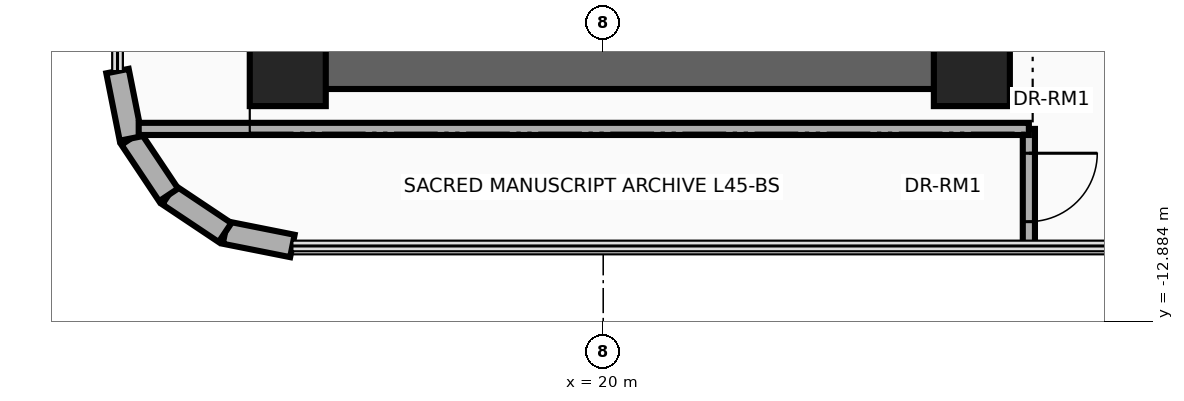
"""IFC4 building model, lengths in metres.
Left out: names, types, materials, properties, quantities, classifications, styles, units other than length and angle.
Written with IfcOpenShell. Run it as: python <this file> out.ifc"""

import sys

from ifc_helpers import new_model, si_unit, direction, frame, frame_2d, origin, origin_2d, place, context, subcontext, project, spatial, rectangle, extrude, source, transform, mapped, element, fill, save


model = new_model("IFC4")
c1 = context("Model", 3, precision=1e-05, world=origin(), true_north=direction((0.0, 1.0)))
c2 = subcontext(c1, "Body", "Model", "MODEL_VIEW")
j1 = project(units=[si_unit("LENGTHUNIT", "METRE"), si_unit("PLANEANGLEUNIT", "RADIAN")], contexts=[c1])
p1 = place(None, origin())
s1 = spatial("IfcSite", under=j1, at=p1, CompositionType="ELEMENT")
p2 = place(p1, origin())
s2 = spatial("IfcBuilding", under=s1, at=p2, CompositionType="ELEMENT")
p3 = place(p2, frame((0.0, 0.0, 176.55)))
s3 = spatial("IfcBuildingStorey", under=s2, at=p3, CompositionType="ELEMENT", Elevation=176.55)
p4 = place(p3, frame((24.85, -9.825, 0.0), z_axis=(0.0, 0.0, 1.0), x_axis=(0.0, 1.0, 0.0)))
e1 = element("IfcWall", 1, at=p4, inside=s3, PredefinedType="SHEAR", context=c2, shape_type="SweptSolid", body=[
    extrude(rectangle(XDim=8.875, YDim=0.55, at=frame_2d((4.438, 0.0))), origin(), (0.0, 0.0, 1.0), 3.63),
])
p5 = place(p3, frame((15.85, -9.55, 0.0), z_axis=(0.0, 0.0, 1.0), x_axis=(1.0, 0.0, 0.0)))
e2 = element("IfcWall", 2, at=p5, inside=s3, PredefinedType="SHEAR", context=c2, shape_type="SweptSolid", body=[
    extrude(rectangle(XDim=9.0, YDim=0.55, at=frame_2d((4.5, 0.0))), origin(), (0.0, 0.0, 1.0), 3.63),
])
m1 = source(origin(), c2, "Body", "SweptSolid", [
    extrude(rectangle(XDim=1.0, YDim=1.0, at=origin_2d()), origin(), (0.0, 0.0, 1.0), 3.95),
])
for number, where, z_axis, x_axis in (
    (3, (15.85, -9.55, 0.0), (0.0, 0.0, 1.0), (1.0, 0.0, 0.0)),
    (4, (24.85, -9.55, 0.0), (0.0, 0.0, 1.0), (1.0, 0.0, 0.0)),
):
    element("IfcColumn", number, at=place(p3, frame(where, z_axis=z_axis, x_axis=x_axis)), inside=s3, PredefinedType="COLUMN", context=c2, shape_type="MappedRepresentation", body=[
        mapped(m1, transform((0.0, 0.0, 0.0), x_axis=(1.0, 0.0, 0.0), y_axis=(0.0, 1.0, 0.0), z_axis=(0.0, 0.0, 1.0), scale=1.0)),
    ])
p6 = place(p3, frame((15.911, -11.89, 0.0), z_axis=(0.0, 0.0, 1.0), x_axis=(-0.980798241101, 0.195025152871, 0.0)))
e5 = element("IfcWall", 5, at=p6, inside=s3, PredefinedType="SOLIDWALL", context=c2, shape_type="SweptSolid", body=[
    extrude(rectangle(XDim=0.904, YDim=0.3, at=frame_2d((0.452, 0.0))), origin(), (0.0, 0.0, 1.0), 3.63),
])
for number, where, z_axis, x_axis in (
    (6, (15.024, -11.714, 0.0), (0.0, 0.0, 1.0), (-0.832, 0.556, 0.0)),
    (7, (14.282, -11.218, 0.0), (0.0, 0.0, 1.0), (-0.556, 0.832, 0.0)),
):
    element("IfcWall", number, at=place(p3, frame(where, z_axis=z_axis, x_axis=x_axis)), inside=s3, PredefinedType="SOLIDWALL", context=c2, shape_type="SweptSolid", body=[
        extrude(rectangle(XDim=0.893, YDim=0.3, at=frame_2d((0.446, 0.0))), origin(), (0.0, 0.0, 1.0), 3.63),
    ])
p7 = place(p3, frame((13.786, -10.476, 0.0), z_axis=(0.0, 0.0, 1.0), x_axis=(-0.195025152871, 0.980798241101, 0.0)))
e8 = element("IfcWall", 8, at=p7, inside=s3, PredefinedType="SOLIDWALL", context=c2, shape_type="SweptSolid", body=[
    extrude(rectangle(XDim=0.904, YDim=0.3, at=frame_2d((0.452, 0.0))), origin(), (0.0, 0.0, 1.0), 3.63),
])
p8 = place(p3, frame((25.6, -11.89, 0.0), z_axis=(0.0, 0.0, 1.0), x_axis=(0.0, 1.0, 0.0)))
e9 = element("IfcWall", 9, at=p8, inside=s3, PredefinedType="PARTITIONING", context=c2, shape_type="SweptSolid", body=[
    extrude(rectangle(XDim=1.54, YDim=0.16, at=frame_2d((0.77, 0.0))), origin(), (0.0, 0.0, 1.0), 3.63),
])
p9 = place(p8, frame((0.32, 0.0, 0.0)))
e10 = element("IfcOpeningElement", 10, at=p9, cuts=e9, PredefinedType="OPENING", context=c2, shape_type="SweptSolid", body=[
    extrude(rectangle(XDim=0.9, YDim=2.1, at=frame_2d((0.45, 1.05))), frame((0.0, 0.095, 0.0), z_axis=(0.0, -1.0, 0.0), x_axis=(1.0, 0.0, 0.0)), (0.0, 0.0, 1.0), 0.19),
])
p10 = place(p3, frame((13.889, -10.35, 0.0), z_axis=(0.0, 0.0, 1.0), x_axis=(1.0, 0.0, 0.0)))
e11 = element("IfcWall", 11, at=p10, inside=s3, PredefinedType="PARTITIONING", context=c2, shape_type="SweptSolid", body=[
    extrude(rectangle(XDim=11.711, YDim=0.16, at=frame_2d((5.855, 0.0))), origin(), (0.0, 0.0, 1.0), 3.63),
])
p11 = place(p9, frame((0.9, 0.0, 0.0), z_axis=(0.0, 0.0, 1.0), x_axis=(-1.0, 0.0, 0.0)))
e12 = element("IfcDoor", 12, at=p11, inside=s3, OperationType="SINGLE_SWING_LEFT", PredefinedType="DOOR", context=c2, shape_type="SweptSolid", body=[
    extrude(rectangle(XDim=0.9, YDim=2.1, at=frame_2d((0.45, 1.05))), frame((0.0, 0.025, 0.0), z_axis=(0.0, -1.0, 0.0), x_axis=(1.0, 0.0, 0.0)), (0.0, 0.0, 1.0), 0.05),
])
fill(e10, e12)
save(model, sys.argv[1])
